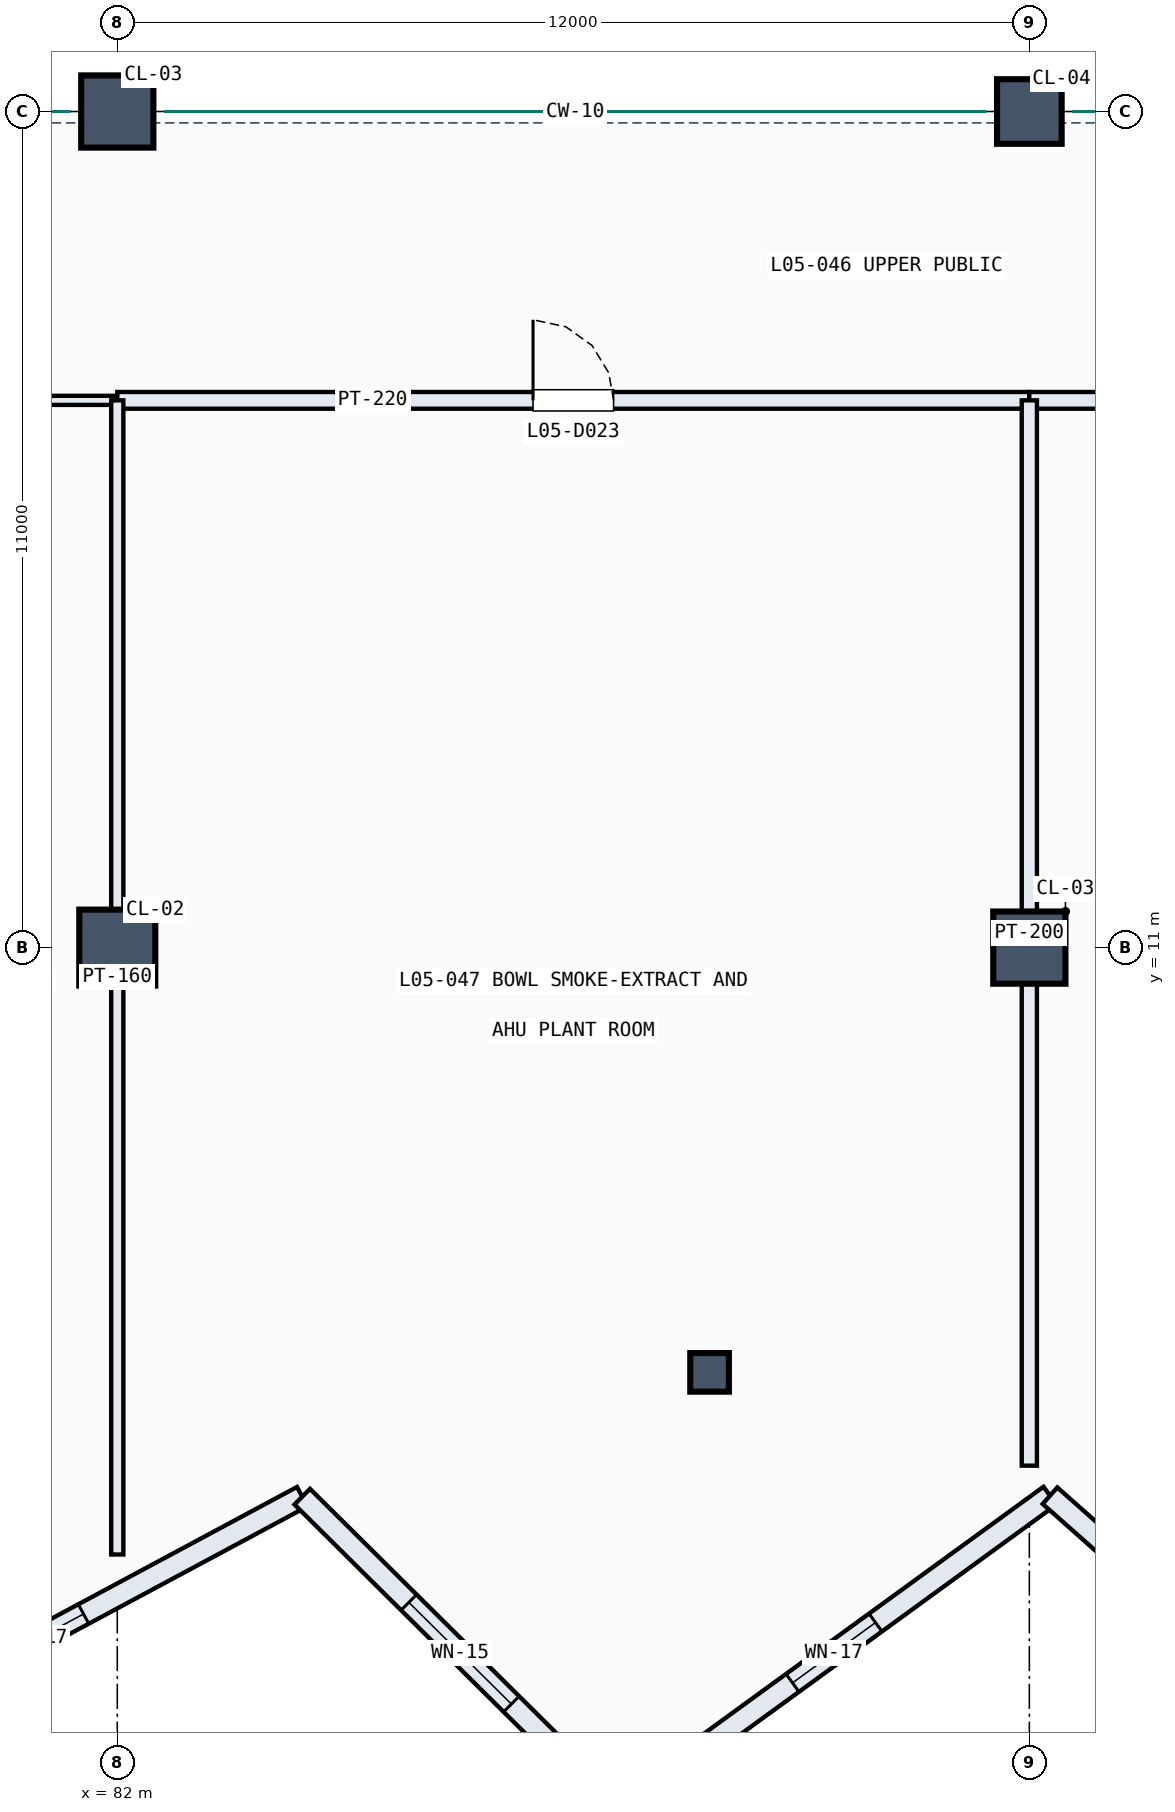
"""IFC4 building model, lengths in metres.
Left out: names, types, materials, properties, quantities, classifications, styles, units other than length and angle.
Written with IfcOpenShell. Run it as: python <this file> out.ifc"""

import sys

from ifc_helpers import new_model, si_unit, direction, frame, frame_2d, origin, origin_2d, place, context, subcontext, project, spatial, rectangle, hollow_circle, extrude, element, fill, save


model = new_model("IFC4")
c1 = context("Model", 3, precision=1e-05, world=origin(), true_north=direction((0.0, 1.0)))
c2 = subcontext(c1, "Body", "Model", "MODEL_VIEW")
j1 = project(units=[si_unit("LENGTHUNIT", "METRE"), si_unit("PLANEANGLEUNIT", "RADIAN")], contexts=[c1])
p1 = place(None, origin())
s1 = spatial("IfcSite", under=j1, at=p1, CompositionType="ELEMENT")
p2 = place(p1, origin())
s2 = spatial("IfcBuilding", under=s1, at=p2, CompositionType="ELEMENT")
p3 = place(p2, frame((0.0, 0.0, 24.3)))
s3 = spatial("IfcBuildingStorey", under=s2, at=p3, CompositionType="ELEMENT", Elevation=24.3)
p4 = place(p3, frame((82.0, 11.0, 0.0), z_axis=(0.0, 0.0, 1.0), x_axis=(1.0, 0.0, 0.0)))
e1 = element("IfcColumn", 1, at=p4, inside=s3, PredefinedType="COLUMN", context=c2, shape_type="SweptSolid", body=[
    extrude(rectangle(XDim=1.0, YDim=1.0, at=origin_2d()), origin(), (0.0, 0.0, 1.0), 5.4),
])
for number, where, z_axis, x_axis in (
    (2, (82.0, 22.0, 0.0), (0.0, 0.0, 1.0), (1.0, 0.0, 0.0)),
    (3, (94.0, 11.0, 0.0), (0.0, 0.0, 1.0), (1.0, 0.0, 0.0)),
):
    element("IfcColumn", number, at=place(p3, frame(where, z_axis=z_axis, x_axis=x_axis)), inside=s3, PredefinedType="COLUMN", context=c2, shape_type="SweptSolid", body=[
        extrude(rectangle(XDim=0.95, YDim=0.95, at=origin_2d()), origin(), (0.0, 0.0, 1.0), 5.4),
    ])
p5 = place(p3, frame((94.0, 22.0, 0.0), z_axis=(0.0, 0.0, 1.0), x_axis=(1.0, 0.0, 0.0)))
e4 = element("IfcColumn", 4, at=p5, inside=s3, PredefinedType="COLUMN", context=c2, shape_type="SweptSolid", body=[
    extrude(rectangle(XDim=0.85, YDim=0.85, at=origin_2d()), origin(), (0.0, 0.0, 1.0), 5.4),
])
p6 = place(p3, frame((89.793, 5.412, 0.0), z_axis=(0.0, 0.0, 1.0), x_axis=(1.0, 0.0, 0.0)))
e5 = element("IfcColumn", 5, at=p6, inside=s3, PredefinedType="COLUMN", context=c2, shape_type="SweptSolid", body=[
    extrude(hollow_circle(Radius=0.254, WallThickness=0.02, at=origin_2d()), origin(), (0.0, 0.0, 1.0), 6.05),
])
p7 = place(p3, frame((77.489, 0.051, 0.0), z_axis=(0.0, 0.0, 1.0), x_axis=(0.881201188687, 0.472741435731, 0.0)))
e6 = element("IfcWall", 6, at=p7, inside=s3, PredefinedType="USERDEFINED", context=c2, shape_type="SweptSolid", body=[
    extrude(rectangle(XDim=7.881, YDim=0.29, at=frame_2d((3.94, 0.0))), origin(), (0.0, 0.0, 1.0), 4.34),
])
p8 = place(p7, frame((3.265, 0.0, 0.8)))
e7 = element("IfcOpeningElement", 7, at=p8, cuts=e6, PredefinedType="OPENING", context=c2, shape_type="SweptSolid", body=[
    extrude(rectangle(XDim=1.35, YDim=2.1, at=frame_2d((0.675, 1.05))), frame((0.0, 0.155, 0.0), z_axis=(0.0, -1.0, 0.0), x_axis=(1.0, 0.0, 0.0)), (0.0, 0.0, 1.0), 0.31),
])
p9 = place(p3, frame((84.434, 3.777, 0.0), z_axis=(0.0, 0.0, 1.0), x_axis=(0.710084208502, -0.704116763638, 0.0)))
e8 = element("IfcWall", 8, at=p9, inside=s3, PredefinedType="USERDEFINED", context=c2, shape_type="SweptSolid", body=[
    extrude(rectangle(XDim=5.85, YDim=0.29, at=frame_2d((2.925, 0.0))), origin(), (0.0, 0.0, 1.0), 4.34),
])
p10 = place(p9, frame((1.975, 0.0, 0.85)))
e9 = element("IfcOpeningElement", 9, at=p10, cuts=e8, PredefinedType="OPENING", context=c2, shape_type="SweptSolid", body=[
    extrude(rectangle(XDim=1.9, YDim=1.6, at=frame_2d((0.95, 0.8))), frame((0.0, 0.155, 0.0), z_axis=(0.0, -1.0, 0.0), x_axis=(1.0, 0.0, 0.0)), (0.0, 0.0, 1.0), 0.31),
])
p11 = place(p3, frame((88.588, -0.343, 0.0), z_axis=(0.0, 0.0, 1.0), x_axis=(0.808841233488, 0.588027090371, 0.0)))
e10 = element("IfcWall", 10, at=p11, inside=s3, PredefinedType="USERDEFINED", context=c2, shape_type="SweptSolid", body=[
    extrude(rectangle(XDim=7.027, YDim=0.29, at=frame_2d((3.514, 0.0))), origin(), (0.0, 0.0, 1.0), 4.34),
])
p12 = place(p11, frame((2.839, 0.0, 0.8)))
e11 = element("IfcOpeningElement", 11, at=p12, cuts=e10, PredefinedType="OPENING", context=c2, shape_type="SweptSolid", body=[
    extrude(rectangle(XDim=1.35, YDim=2.1, at=frame_2d((0.675, 1.05))), frame((0.0, 0.155, 0.0), z_axis=(0.0, -1.0, 0.0), x_axis=(1.0, 0.0, 0.0)), (0.0, 0.0, 1.0), 0.31),
])
p13 = place(p3, frame((94.272, 3.79, 0.0), z_axis=(0.0, 0.0, 1.0), x_axis=(0.74844895461, -0.663192402205, 0.0)))
e12 = element("IfcWall", 12, at=p13, inside=s3, PredefinedType="USERDEFINED", context=c2, shape_type="SweptSolid", body=[
    extrude(rectangle(XDim=6.317, YDim=0.29, at=frame_2d((3.159, 0.0))), origin(), (0.0, 0.0, 1.0), 4.34),
])
p14 = place(p13, frame((2.208, 0.0, 0.85)))
e13 = element("IfcOpeningElement", 13, at=p14, cuts=e12, PredefinedType="OPENING", context=c2, shape_type="SweptSolid", body=[
    extrude(rectangle(XDim=1.9, YDim=1.6, at=frame_2d((0.95, 0.8))), frame((0.0, 0.155, 0.0), z_axis=(0.0, -1.0, 0.0), x_axis=(1.0, 0.0, 0.0)), (0.0, 0.0, 1.0), 0.31),
])
p15 = place(p3, frame((76.0, 18.2, 0.0), z_axis=(0.0, 0.0, 1.0), x_axis=(1.0, 0.0, 0.0)))
e14 = element("IfcWall", 14, at=p15, inside=s3, PredefinedType="PARTITIONING", context=c2, shape_type="SweptSolid", body=[
    extrude(rectangle(XDim=6.0, YDim=0.12, at=frame_2d((3.0, 0.0))), origin(), (0.0, 0.0, 1.0), 5.18),
])
p16 = place(p15, frame((2.51, 0.0, 0.0)))
e15 = element("IfcOpeningElement", 15, at=p16, cuts=e14, PredefinedType="OPENING", context=c2, shape_type="SweptSolid", body=[
    extrude(rectangle(XDim=0.98, YDim=2.1, at=frame_2d((0.49, 1.05))), frame((0.0, 0.07, 0.0), z_axis=(0.0, -1.0, 0.0), x_axis=(1.0, 0.0, 0.0)), (0.0, 0.0, 1.0), 0.14),
])
p17 = place(p3, frame((82.0, 18.2, 0.0), z_axis=(0.0, 0.0, 1.0), x_axis=(1.0, 0.0, 0.0)))
e16 = element("IfcWall", 16, at=p17, inside=s3, PredefinedType="PARTITIONING", context=c2, shape_type="SweptSolid", body=[
    extrude(rectangle(XDim=12.0, YDim=0.22, at=frame_2d((6.0, 0.0))), origin(), (0.0, 0.0, 1.0), 5.18),
])
p18 = place(p17, frame((5.47, 0.0, 0.0)))
e17 = element("IfcOpeningElement", 17, at=p18, cuts=e16, PredefinedType="OPENING", context=c2, shape_type="SweptSolid", body=[
    extrude(rectangle(XDim=1.06, YDim=2.3, at=frame_2d((0.53, 1.15))), frame((0.0, 0.12, 0.0), z_axis=(0.0, -1.0, 0.0), x_axis=(1.0, 0.0, 0.0)), (0.0, 0.0, 1.0), 0.24),
])
p19 = place(p3, frame((94.0, 18.2, 0.0), z_axis=(0.0, 0.0, 1.0), x_axis=(1.0, 0.0, 0.0)))
e18 = element("IfcWall", 18, at=p19, inside=s3, PredefinedType="PARTITIONING", context=c2, shape_type="SweptSolid", body=[
    extrude(rectangle(XDim=10.0, YDim=0.22, at=frame_2d((5.0, 0.0))), origin(), (0.0, 0.0, 1.0), 5.18),
])
p20 = place(p19, frame((3.95, 0.0, 0.0)))
e19 = element("IfcOpeningElement", 19, at=p20, cuts=e18, PredefinedType="OPENING", context=c2, shape_type="SweptSolid", body=[
    extrude(rectangle(XDim=2.1, YDim=2.2, at=frame_2d((1.05, 1.1))), frame((0.0, 0.12, 0.0), z_axis=(0.0, -1.0, 0.0), x_axis=(1.0, 0.0, 0.0)), (0.0, 0.0, 1.0), 0.24),
])
p21 = place(p3, frame((82.0, 3.016, 0.0), z_axis=(0.0, 0.0, 1.0), x_axis=(0.0, 1.0, 0.0)))
e20 = element("IfcWall", 20, at=p21, inside=s3, PredefinedType="PARTITIONING", context=c2, shape_type="SweptSolid", body=[
    extrude(rectangle(XDim=15.184, YDim=0.16, at=frame_2d((7.592, 0.0))), origin(), (0.0, 0.0, 1.0), 5.18),
])
p22 = place(p3, frame((94.0, 4.185, 0.0), z_axis=(0.0, 0.0, 1.0), x_axis=(0.0, 1.0, 0.0)))
e21 = element("IfcWall", 21, at=p22, inside=s3, PredefinedType="PARTITIONING", context=c2, shape_type="SweptSolid", body=[
    extrude(rectangle(XDim=14.015, YDim=0.2, at=frame_2d((7.008, 0.0))), origin(), (0.0, 0.0, 1.0), 5.18),
])
p23 = place(p8, origin())
e22 = element("IfcWindow", 22, at=p23, inside=s3, PartitioningType="SINGLE_PANEL", PredefinedType="WINDOW", context=c2, shape_type="SweptSolid", body=[
    extrude(rectangle(XDim=1.35, YDim=2.1, at=frame_2d((0.675, 1.05))), frame((0.0, 0.03, 0.0), z_axis=(0.0, -1.0, 0.0), x_axis=(1.0, 0.0, 0.0)), (0.0, 0.0, 1.0), 0.06),
])
fill(e7, e22)
p24 = place(p10, origin())
e23 = element("IfcWindow", 23, at=p24, inside=s3, PartitioningType="SINGLE_PANEL", PredefinedType="WINDOW", context=c2, shape_type="SweptSolid", body=[
    extrude(rectangle(XDim=1.9, YDim=1.6, at=frame_2d((0.95, 0.8))), frame((0.0, 0.03, 0.0), z_axis=(0.0, -1.0, 0.0), x_axis=(1.0, 0.0, 0.0)), (0.0, 0.0, 1.0), 0.06),
])
fill(e9, e23)
p25 = place(p12, origin())
e24 = element("IfcWindow", 24, at=p25, inside=s3, PartitioningType="SINGLE_PANEL", PredefinedType="WINDOW", context=c2, shape_type="SweptSolid", body=[
    extrude(rectangle(XDim=1.35, YDim=2.1, at=frame_2d((0.675, 1.05))), frame((0.0, 0.03, 0.0), z_axis=(0.0, -1.0, 0.0), x_axis=(1.0, 0.0, 0.0)), (0.0, 0.0, 1.0), 0.06),
])
fill(e11, e24)
p26 = place(p18, origin())
e25 = element("IfcDoor", 25, at=p26, inside=s3, OperationType="SINGLE_SWING_LEFT", PredefinedType="DOOR", context=c2, shape_type="SweptSolid", body=[
    extrude(rectangle(XDim=1.06, YDim=2.3, at=frame_2d((0.53, 1.15))), frame((0.0, 0.025, 0.0), z_axis=(0.0, -1.0, 0.0), x_axis=(1.0, 0.0, 0.0)), (0.0, 0.0, 1.0), 0.05),
])
fill(e17, e25)
save(model, sys.argv[1])
